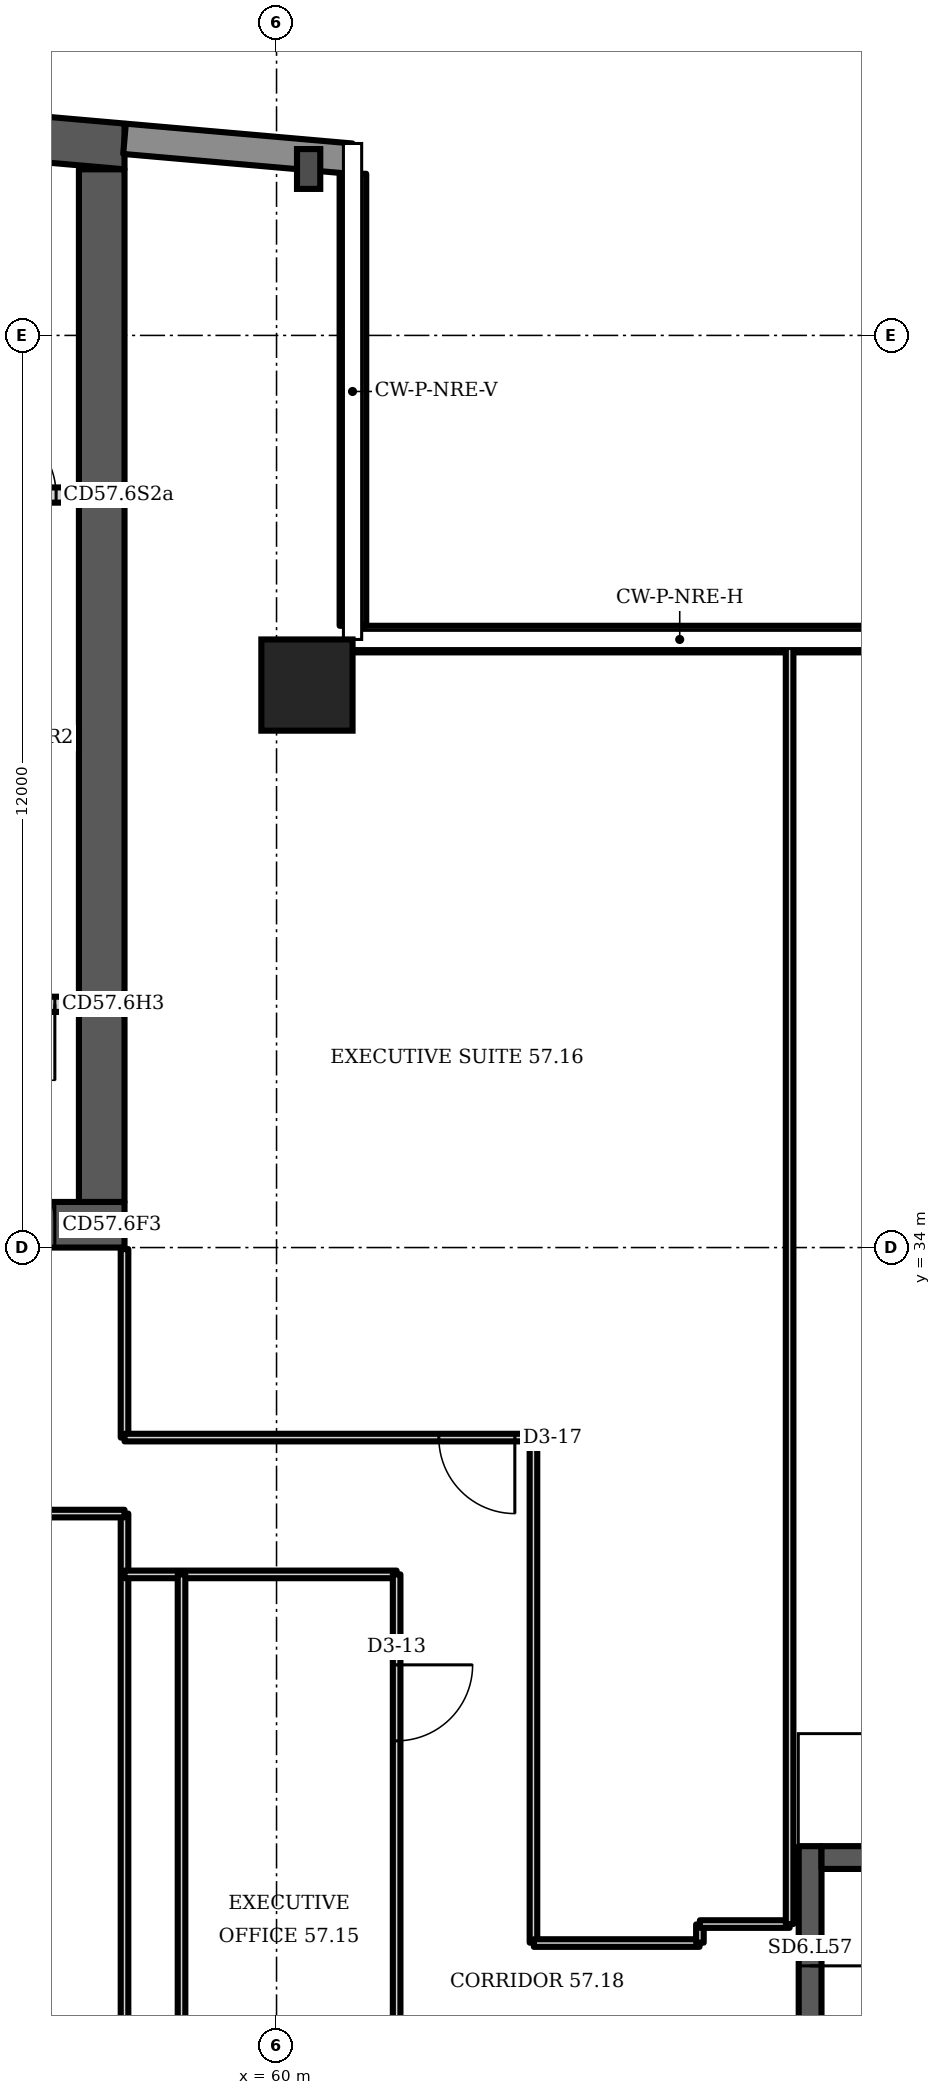
"""IFC4 building model, lengths in metres.
Left out: names, types, materials, properties, quantities, classifications, styles, units other than length and angle.
Written with IfcOpenShell. Run it as: python <this file> out.ifc"""

import sys

from ifc_helpers import new_model, si_unit, direction, frame, frame_2d, origin, origin_2d, place, context, subcontext, project, spatial, polyline, rectangle, i_section, outline, extrude, element, fill, save


model = new_model("IFC4")
c1 = context("Model", 3, precision=1e-05, world=origin(), true_north=direction((0.0, 1.0)))
c2 = subcontext(c1, "Body", "Model", "MODEL_VIEW")
j1 = project(units=[si_unit("LENGTHUNIT", "METRE"), si_unit("PLANEANGLEUNIT", "RADIAN")], contexts=[c1])
p1 = place(None, origin())
s1 = spatial("IfcSite", under=j1, at=p1, CompositionType="ELEMENT")
p2 = place(p1, origin())
s2 = spatial("IfcBuilding", under=s1, at=p2, CompositionType="ELEMENT")
p3 = place(p2, frame((0.0, 0.0, 228.7)))
s3 = spatial("IfcBuildingStorey", under=s2, at=p3, CompositionType="ELEMENT", Elevation=228.7)
p4 = place(p3, origin())
e1 = element("IfcWall", 1, at=p4, inside=s3, PredefinedType="SHEAR", context=c2, shape_type="SweptSolid", body=[
    extrude(outline(polyline([(23.0, 48.185), (40.5, 49.716), (58.0, 48.185), (58.0, 48.787), (40.5, 50.318), (23.0, 48.787), (23.0, 48.185)])), origin(), (0.0, 0.0, 1.0), 3.6),
])
p5 = place(p3, frame((23.0, 34.3, 0.0), z_axis=(0.0, 0.0, 1.0), x_axis=(1.0, 0.0, 0.0)))
e2 = element("IfcWall", 2, at=p5, inside=s3, PredefinedType="SHEAR", context=c2, shape_type="SweptSolid", body=[
    extrude(rectangle(XDim=35.0, YDim=0.6, at=frame_2d((17.5, 0.0))), origin(), (0.0, 0.0, 1.0), 3.6),
])
p6 = place(p5, frame((0.65, 0.0, 0.0)))
e3 = element("IfcOpeningElement", 3, at=p6, cuts=e2, PredefinedType="OPENING", context=c2, shape_type="SweptSolid", body=[
    extrude(rectangle(XDim=1.2, YDim=2.1, at=frame_2d((0.6, 1.05))), frame((0.0, 0.31, 0.0), z_axis=(0.0, -1.0, 0.0), x_axis=(1.0, 0.0, 0.0)), (0.0, 0.0, 1.0), 0.62),
])
p7 = place(p5, frame((7.717, 0.0, 0.0)))
e4 = element("IfcOpeningElement", 4, at=p7, cuts=e2, PredefinedType="OPENING", context=c2, shape_type="SweptSolid", body=[
    extrude(rectangle(XDim=1.1, YDim=2.1, at=frame_2d((0.55, 1.05))), frame((0.0, 0.31, 0.0), z_axis=(0.0, -1.0, 0.0), x_axis=(1.0, 0.0, 0.0)), (0.0, 0.0, 1.0), 0.62),
])
p8 = place(p5, frame((12.183, 0.0, 0.0)))
e5 = element("IfcOpeningElement", 5, at=p8, cuts=e2, PredefinedType="OPENING", context=c2, shape_type="SweptSolid", body=[
    extrude(rectangle(XDim=1.1, YDim=2.1, at=frame_2d((0.55, 1.05))), frame((0.0, 0.31, 0.0), z_axis=(0.0, -1.0, 0.0), x_axis=(1.0, 0.0, 0.0)), (0.0, 0.0, 1.0), 0.62),
])
p9 = place(p5, frame((9.8, 0.0, 0.0)))
e6 = element("IfcOpeningElement", 6, at=p9, cuts=e2, PredefinedType="OPENING", context=c2, shape_type="SweptSolid", body=[
    extrude(rectangle(XDim=1.4, YDim=2.1, at=frame_2d((0.7, 1.05))), frame((0.0, 0.31, 0.0), z_axis=(0.0, -1.0, 0.0), x_axis=(1.0, 0.0, 0.0)), (0.0, 0.0, 1.0), 0.62),
])
p10 = place(p5, frame((14.717, 0.0, 0.0)))
e7 = element("IfcOpeningElement", 7, at=p10, cuts=e2, PredefinedType="OPENING", context=c2, shape_type="SweptSolid", body=[
    extrude(rectangle(XDim=1.1, YDim=2.1, at=frame_2d((0.55, 1.05))), frame((0.0, 0.31, 0.0), z_axis=(0.0, -1.0, 0.0), x_axis=(1.0, 0.0, 0.0)), (0.0, 0.0, 1.0), 0.62),
])
p11 = place(p5, frame((16.95, 0.0, 0.0)))
e8 = element("IfcOpeningElement", 8, at=p11, cuts=e2, PredefinedType="OPENING", context=c2, shape_type="SweptSolid", body=[
    extrude(rectangle(XDim=1.1, YDim=2.1, at=frame_2d((0.55, 1.05))), frame((0.0, 0.31, 0.0), z_axis=(0.0, -1.0, 0.0), x_axis=(1.0, 0.0, 0.0)), (0.0, 0.0, 1.0), 0.62),
])
p12 = place(p5, frame((19.183, 0.0, 0.0)))
e9 = element("IfcOpeningElement", 9, at=p12, cuts=e2, PredefinedType="OPENING", context=c2, shape_type="SweptSolid", body=[
    extrude(rectangle(XDim=1.1, YDim=2.1, at=frame_2d((0.55, 1.05))), frame((0.0, 0.31, 0.0), z_axis=(0.0, -1.0, 0.0), x_axis=(1.0, 0.0, 0.0)), (0.0, 0.0, 1.0), 0.62),
])
p13 = place(p5, frame((26.15, 0.0, 0.0)))
e10 = element("IfcOpeningElement", 10, at=p13, cuts=e2, PredefinedType="OPENING", context=c2, shape_type="SweptSolid", body=[
    extrude(rectangle(XDim=1.2, YDim=2.1, at=frame_2d((0.6, 1.05))), frame((0.0, 0.31, 0.0), z_axis=(0.0, -1.0, 0.0), x_axis=(1.0, 0.0, 0.0)), (0.0, 0.0, 1.0), 0.62),
])
p14 = place(p5, frame((28.767, 0.0, 0.0)))
e11 = element("IfcOpeningElement", 11, at=p14, cuts=e2, PredefinedType="OPENING", context=c2, shape_type="SweptSolid", body=[
    extrude(rectangle(XDim=1.0, YDim=2.1, at=frame_2d((0.5, 1.05))), frame((0.0, 0.31, 0.0), z_axis=(0.0, -1.0, 0.0), x_axis=(1.0, 0.0, 0.0)), (0.0, 0.0, 1.0), 0.62),
])
p15 = place(p5, frame((33.083, 0.0, 0.0)))
e12 = element("IfcOpeningElement", 12, at=p15, cuts=e2, PredefinedType="OPENING", context=c2, shape_type="SweptSolid", body=[
    extrude(rectangle(XDim=1.0, YDim=2.1, at=frame_2d((0.5, 1.05))), frame((0.0, 0.31, 0.0), z_axis=(0.0, -1.0, 0.0), x_axis=(1.0, 0.0, 0.0)), (0.0, 0.0, 1.0), 0.62),
])
p16 = place(p5, frame((30.8, 0.0, 0.0)))
e13 = element("IfcOpeningElement", 13, at=p16, cuts=e2, PredefinedType="OPENING", context=c2, shape_type="SweptSolid", body=[
    extrude(rectangle(XDim=1.4, YDim=2.1, at=frame_2d((0.7, 1.05))), frame((0.0, 0.31, 0.0), z_axis=(0.0, -1.0, 0.0), x_axis=(1.0, 0.0, 0.0)), (0.0, 0.0, 1.0), 0.62),
])
p17 = place(p3, frame((57.7, 34.6, 0.0), z_axis=(0.0, 0.0, 1.0), x_axis=(0.0, 1.0, 0.0)))
e14 = element("IfcWall", 14, at=p17, inside=s3, PredefinedType="SHEAR", context=c2, shape_type="SweptSolid", body=[
    extrude(rectangle(XDim=13.585, YDim=0.6, at=frame_2d((6.792, 0.0))), origin(), (0.0, 0.0, 1.0), 3.6),
])
p18 = place(p3, frame((60.4, 41.4, 0.0), z_axis=(0.0, 0.0, 1.0), x_axis=(1.0, 0.0, 0.0)))
e15 = element("IfcColumn", 15, at=p18, inside=s3, PredefinedType="COLUMN", context=c2, shape_type="SweptSolid", body=[
    extrude(rectangle(XDim=1.2, YDim=1.2, at=origin_2d()), origin(), (0.0, 0.0, 1.0), 3.6),
])
p19 = place(p3, frame((60.422, 48.189, 0.0), z_axis=(0.0, 0.0, 1.0), x_axis=(1.0, 0.0, 0.0)))
e16 = element("IfcColumn", 16, at=p19, inside=s3, PredefinedType="COLUMN", context=c2, shape_type="SweptSolid", body=[
    extrude(i_section(OverallWidth=0.306, OverallDepth=0.524, WebThickness=0.021, FlangeThickness=0.04, FilletRadius=0.027, at=origin_2d()), origin(), (0.0, 0.0, 1.0), 3.6),
])
p20 = place(p3, frame((60.983, 48.326, 0.0), z_axis=(0.0, 0.0, 1.0), x_axis=(-0.996194, 0.087168, 0.0)))
e17 = element("IfcWall", 17, at=p20, inside=s3, PredefinedType="SOLIDWALL", context=c2, shape_type="SweptSolid", body=[
    extrude(rectangle(XDim=2.994, YDim=0.4, at=frame_2d((1.497, 0.0))), origin(), (0.0, 0.0, 1.0), 3.2),
])
p21 = place(p3, frame((68.803, 42.005, 0.0), z_axis=(0.0, 0.0, 1.0), x_axis=(-1.0, 0.0, 0.0)))
e18 = element("IfcWall", 18, at=p21, inside=s3, PredefinedType="SOLIDWALL", context=c2, shape_type="SweptSolid", body=[
    extrude(rectangle(XDim=7.803, YDim=0.35, at=frame_2d((3.902, 0.0))), origin(), (0.0, 0.0, 1.0), 1.0),
])
p22 = place(p3, frame((61.005, 42.18, 0.0), z_axis=(0.0, 0.0, 1.0), x_axis=(0.0, 1.0, 0.0)))
e19 = element("IfcWall", 19, at=p22, inside=s3, PredefinedType="SOLIDWALL", context=c2, shape_type="SweptSolid", body=[
    extrude(rectangle(XDim=5.947, YDim=0.35, at=frame_2d((2.973, 0.0))), origin(), (0.0, 0.0, 1.0), 1.0),
])
p23 = place(p3, frame((55.767, 37.2, 0.0), z_axis=(0.0, 0.0, 1.0), x_axis=(1.0, 0.0, 0.0)))
e20 = element("IfcWall", 20, at=p23, inside=s3, PredefinedType="PARTITIONING", context=c2, shape_type="SweptSolid", body=[
    extrude(rectangle(XDim=1.633, YDim=0.2, at=frame_2d((0.817, 0.0))), origin(), (0.0, 0.0, 1.0), 3.2),
])
p24 = place(p23, frame((0.317, 0.0, 0.0)))
e21 = element("IfcOpeningElement", 21, at=p24, cuts=e20, PredefinedType="OPENING", context=c2, shape_type="SweptSolid", body=[
    extrude(rectangle(XDim=1.0, YDim=2.1, at=frame_2d((0.5, 1.05))), frame((0.0, 0.11, 0.0), z_axis=(0.0, -1.0, 0.0), x_axis=(1.0, 0.0, 0.0)), (0.0, 0.0, 1.0), 0.22),
])
p25 = place(p3, frame((51.3, 40.7, 0.0), z_axis=(0.0, 0.0, 1.0), x_axis=(1.0, 0.0, 0.0)))
e22 = element("IfcWall", 22, at=p25, inside=s3, PredefinedType="PARTITIONING", context=c2, shape_type="SweptSolid", body=[
    extrude(rectangle(XDim=6.1, YDim=0.2, at=frame_2d((3.05, 0.0))), origin(), (0.0, 0.0, 1.0), 3.2),
])
p26 = place(p25, frame((0.417, 0.0, 0.0)))
e23 = element("IfcOpeningElement", 23, at=p26, cuts=e22, PredefinedType="OPENING", context=c2, shape_type="SweptSolid", body=[
    extrude(rectangle(XDim=1.1, YDim=2.1, at=frame_2d((0.55, 1.05))), frame((0.0, 0.11, 0.0), z_axis=(0.0, -1.0, 0.0), x_axis=(1.0, 0.0, 0.0)), (0.0, 0.0, 1.0), 0.22),
])
p27 = place(p25, frame((3.617, 0.0, 0.0)))
e24 = element("IfcOpeningElement", 24, at=p27, cuts=e22, PredefinedType="OPENING", context=c2, shape_type="SweptSolid", body=[
    extrude(rectangle(XDim=1.0, YDim=2.1, at=frame_2d((0.5, 1.05))), frame((0.0, 0.11, 0.0), z_axis=(0.0, -1.0, 0.0), x_axis=(1.0, 0.0, 0.0)), (0.0, 0.0, 1.0), 0.22),
])
p28 = place(p3, frame((51.3, 43.9, 0.0), z_axis=(0.0, 0.0, 1.0), x_axis=(1.0, 0.0, 0.0)))
e25 = element("IfcWall", 25, at=p28, inside=s3, PredefinedType="PARTITIONING", context=c2, shape_type="SweptSolid", body=[
    extrude(rectangle(XDim=6.1, YDim=0.2, at=frame_2d((3.05, 0.0))), origin(), (0.0, 0.0, 1.0), 3.2),
])
p29 = place(p28, frame((2.817, 0.0, 0.0)))
e26 = element("IfcOpeningElement", 26, at=p29, cuts=e25, PredefinedType="OPENING", context=c2, shape_type="SweptSolid", body=[
    extrude(rectangle(XDim=1.0, YDim=2.1, at=frame_2d((0.5, 1.05))), frame((0.0, 0.11, 0.0), z_axis=(0.0, -1.0, 0.0), x_axis=(1.0, 0.0, 0.0)), (0.0, 0.0, 1.0), 0.22),
])
p30 = place(p28, frame((4.8, 0.0, 0.0)))
e27 = element("IfcOpeningElement", 27, at=p30, cuts=e25, PredefinedType="OPENING", context=c2, shape_type="SweptSolid", body=[
    extrude(rectangle(XDim=1.0, YDim=2.1, at=frame_2d((0.5, 1.05))), frame((0.0, 0.11, 0.0), z_axis=(0.0, -1.0, 0.0), x_axis=(1.0, 0.0, 0.0)), (0.0, 0.0, 1.0), 0.22),
])
p31 = place(p3, frame((67.02, 21.775, 0.0), z_axis=(0.0, 0.0, 1.0), x_axis=(0.0, 1.0, 0.0)))
e28 = element("IfcWall", 28, at=p31, inside=s3, PredefinedType="SHEAR", context=c2, shape_type="SweptSolid", body=[
    extrude(rectangle(XDim=4.35, YDim=0.3, at=frame_2d((2.175, 0.0))), origin(), (0.0, 0.0, 1.0), 3.2),
])
p32 = place(p31, frame((1.575, 0.0, 0.0)))
e29 = element("IfcOpeningElement", 29, at=p32, cuts=e28, PredefinedType="OPENING", context=c2, shape_type="SweptSolid", body=[
    extrude(rectangle(XDim=1.2, YDim=2.1, at=frame_2d((0.6, 1.05))), frame((0.0, 0.16, 0.0), z_axis=(0.0, -1.0, 0.0), x_axis=(1.0, 0.0, 0.0)), (0.0, 0.0, 1.0), 0.32),
])
p33 = place(p3, frame((58.0, 17.0, 0.0), z_axis=(0.0, 0.0, 1.0), x_axis=(0.0, 1.0, 0.0)))
e30 = element("IfcWall", 30, at=p33, inside=s3, PredefinedType="PARTITIONING", context=c2, shape_type="SweptSolid", body=[
    extrude(rectangle(XDim=13.5, YDim=0.1, at=frame_2d((6.75, 0.0))), origin(), (0.0, 0.0, 1.0), 3.2),
])
p34 = place(p3, frame((58.0, 29.7, 0.0), z_axis=(0.0, 0.0, 1.0), x_axis=(1.0, 0.0, 0.0)))
e31 = element("IfcWall", 31, at=p34, inside=s3, PredefinedType="PARTITIONING", context=c2, shape_type="SweptSolid", body=[
    extrude(rectangle(XDim=3.58, YDim=0.1, at=frame_2d((1.79, 0.0))), origin(), (0.0, 0.0, 1.0), 3.2),
])
p35 = place(p3, frame((58.0, 31.5, 0.0), z_axis=(0.0, 0.0, 1.0), x_axis=(0.0, 1.0, 0.0)))
e32 = element("IfcWall", 32, at=p35, inside=s3, PredefinedType="PARTITIONING", context=c2, shape_type="SweptSolid", body=[
    extrude(rectangle(XDim=2.48, YDim=0.1, at=frame_2d((1.24, 0.0))), origin(), (0.0, 0.0, 1.0), 3.2),
])
p36 = place(p3, frame((58.0, 31.5, 0.0), z_axis=(0.0, 0.0, 1.0), x_axis=(1.0, 0.0, 0.0)))
e33 = element("IfcWall", 33, at=p36, inside=s3, PredefinedType="PARTITIONING", context=c2, shape_type="SweptSolid", body=[
    extrude(rectangle(XDim=5.38, YDim=0.1, at=frame_2d((2.69, 0.0))), origin(), (0.0, 0.0, 1.0), 3.2),
])
p37 = place(p36, frame((4.135, 0.0, 0.0)))
e34 = element("IfcOpeningElement", 34, at=p37, cuts=e33, PredefinedType="OPENING", context=c2, shape_type="SweptSolid", body=[
    extrude(rectangle(XDim=1.0, YDim=2.1, at=frame_2d((0.5, 1.05))), frame((0.0, 0.06, 0.0), z_axis=(0.0, -1.0, 0.0), x_axis=(1.0, 0.0, 0.0)), (0.0, 0.0, 1.0), 0.12),
])
p38 = place(p3, frame((58.75, 23.35, 0.0), z_axis=(0.0, 0.0, 1.0), x_axis=(0.0, 1.0, 0.0)))
e35 = element("IfcWall", 35, at=p38, inside=s3, PredefinedType="PARTITIONING", context=c2, shape_type="SweptSolid", body=[
    extrude(rectangle(XDim=6.35, YDim=0.1, at=frame_2d((3.175, 0.0))), origin(), (0.0, 0.0, 1.0), 3.2),
])
p39 = place(p3, frame((61.58, 4.88, 0.0), z_axis=(0.0, 0.0, 1.0), x_axis=(0.0, 1.0, 0.0)))
e36 = element("IfcWall", 36, at=p39, inside=s3, PredefinedType="PARTITIONING", context=c2, shape_type="SweptSolid", body=[
    extrude(rectangle(XDim=24.82, YDim=0.1, at=frame_2d((12.41, 0.0))), origin(), (0.0, 0.0, 1.0), 3.2),
])
p40 = place(p39, frame((1.24, 0.0, 0.0)))
e37 = element("IfcOpeningElement", 37, at=p40, cuts=e36, PredefinedType="OPENING", context=c2, shape_type="SweptSolid", body=[
    extrude(rectangle(XDim=1.0, YDim=2.1, at=frame_2d((0.5, 1.05))), frame((0.0, 0.06, 0.0), z_axis=(0.0, -1.0, 0.0), x_axis=(1.0, 0.0, 0.0)), (0.0, 0.0, 1.0), 0.12),
])
p41 = place(p39, frame((5.09, 0.0, 0.0)))
e38 = element("IfcOpeningElement", 38, at=p41, cuts=e36, PredefinedType="OPENING", context=c2, shape_type="SweptSolid", body=[
    extrude(rectangle(XDim=1.0, YDim=2.1, at=frame_2d((0.5, 1.05))), frame((0.0, 0.06, 0.0), z_axis=(0.0, -1.0, 0.0), x_axis=(1.0, 0.0, 0.0)), (0.0, 0.0, 1.0), 0.12),
])
p42 = place(p39, frame((9.415, 0.0, 0.0)))
e39 = element("IfcOpeningElement", 39, at=p42, cuts=e36, PredefinedType="OPENING", context=c2, shape_type="SweptSolid", body=[
    extrude(rectangle(XDim=1.0, YDim=2.1, at=frame_2d((0.5, 1.05))), frame((0.0, 0.06, 0.0), z_axis=(0.0, -1.0, 0.0), x_axis=(1.0, 0.0, 0.0)), (0.0, 0.0, 1.0), 0.12),
])
p43 = place(p39, frame((14.85, 0.0, 0.0)))
e40 = element("IfcOpeningElement", 40, at=p43, cuts=e36, PredefinedType="OPENING", context=c2, shape_type="SweptSolid", body=[
    extrude(rectangle(XDim=1.0, YDim=2.1, at=frame_2d((0.5, 1.05))), frame((0.0, 0.06, 0.0), z_axis=(0.0, -1.0, 0.0), x_axis=(1.0, 0.0, 0.0)), (0.0, 0.0, 1.0), 0.12),
])
p44 = place(p39, frame((22.63, 0.0, 0.0)))
e41 = element("IfcOpeningElement", 41, at=p44, cuts=e36, PredefinedType="OPENING", context=c2, shape_type="SweptSolid", body=[
    extrude(rectangle(XDim=1.0, YDim=2.1, at=frame_2d((0.5, 1.05))), frame((0.0, 0.06, 0.0), z_axis=(0.0, -1.0, 0.0), x_axis=(1.0, 0.0, 0.0)), (0.0, 0.0, 1.0), 0.12),
])
p45 = place(p3, frame((63.38, 24.855, 0.0), z_axis=(0.0, 0.0, 1.0), x_axis=(0.0, 1.0, 0.0)))
e42 = element("IfcWall", 42, at=p45, inside=s3, PredefinedType="PARTITIONING", context=c2, shape_type="SweptSolid", body=[
    extrude(rectangle(XDim=6.645, YDim=0.1, at=frame_2d((3.323, 0.0))), origin(), (0.0, 0.0, 1.0), 3.2),
])
p46 = place(p3, frame((63.385, 24.85, 0.0), z_axis=(0.0, 0.0, 1.0), x_axis=(1.0, 0.0, 0.0)))
e43 = element("IfcWall", 43, at=p46, inside=s3, PredefinedType="PARTITIONING", context=c2, shape_type="SweptSolid", body=[
    extrude(rectangle(XDim=2.18, YDim=0.1, at=frame_2d((1.09, 0.0))), origin(), (0.0, 0.0, 1.0), 3.2),
])
p47 = place(p3, frame((65.57, 24.855, 0.0), z_axis=(0.0, 0.0, 1.0), x_axis=(0.0, 1.0, 0.0)))
e44 = element("IfcWall", 44, at=p47, inside=s3, PredefinedType="PARTITIONING", context=c2, shape_type="SweptSolid", body=[
    extrude(rectangle(XDim=0.24, YDim=0.1, at=frame_2d((0.12, 0.0))), origin(), (0.0, 0.0, 1.0), 3.2),
])
p48 = place(p3, frame((65.57, 25.1, 0.0), z_axis=(0.0, 0.0, 1.0), x_axis=(1.0, 0.0, 0.0)))
e45 = element("IfcWall", 45, at=p48, inside=s3, PredefinedType="PARTITIONING", context=c2, shape_type="SweptSolid", body=[
    extrude(rectangle(XDim=1.18, YDim=0.1, at=frame_2d((0.59, 0.0))), origin(), (0.0, 0.0, 1.0), 3.2),
])
p49 = place(p3, frame((66.75, 25.1, 0.0), z_axis=(0.0, 0.0, 1.0), x_axis=(0.0, 1.0, 0.0)))
e46 = element("IfcWall", 46, at=p49, inside=s3, PredefinedType="PARTITIONING", context=c2, shape_type="SweptSolid", body=[
    extrude(rectangle(XDim=16.88, YDim=0.1, at=frame_2d((8.44, 0.0))), origin(), (0.0, 0.0, 1.0), 3.2),
])
p50 = place(p3, frame((44.15, 30.5, 0.0), z_axis=(0.0, 0.0, 1.0), x_axis=(1.0, 0.0, 0.0)))
e47 = element("IfcWall", 47, at=p50, inside=s3, PredefinedType="PARTITIONING", context=c2, shape_type="SweptSolid", body=[
    extrude(rectangle(XDim=13.85, YDim=0.1, at=frame_2d((6.925, 0.0))), origin(), (0.0, 0.0, 1.0), 3.2),
])
p51 = place(p50, frame((6.77, 0.0, 0.0)))
e48 = element("IfcOpeningElement", 48, at=p51, cuts=e47, PredefinedType="OPENING", context=c2, shape_type="SweptSolid", body=[
    extrude(rectangle(XDim=1.0, YDim=2.1, at=frame_2d((0.5, 1.05))), frame((0.0, 0.06, 0.0), z_axis=(0.0, -1.0, 0.0), x_axis=(1.0, 0.0, 0.0)), (0.0, 0.0, 1.0), 0.12),
])
p52 = place(p3, frame((67.17, 25.975, 0.0), z_axis=(0.0, 0.0, 1.0), x_axis=(1.0, 0.0, 0.0)))
e49 = element("IfcWall", 49, at=p52, inside=s3, PredefinedType="SHEAR", context=c2, shape_type="SweptSolid", body=[
    extrude(rectangle(XDim=7.5, YDim=0.3, at=frame_2d((3.75, 0.0))), origin(), (0.0, 0.0, 1.0), 3.2),
])
p53 = place(p15, origin())
e50 = element("IfcDoor", 50, at=p53, inside=s3, OperationType="SINGLE_SWING_LEFT", PredefinedType="DOOR", context=c2, shape_type="SweptSolid", body=[
    extrude(rectangle(XDim=1.0, YDim=2.1, at=frame_2d((0.5, 1.05))), frame((0.0, 0.025, 0.0), z_axis=(0.0, -1.0, 0.0), x_axis=(1.0, 0.0, 0.0)), (0.0, 0.0, 1.0), 0.05),
])
fill(e12, e50)
p54 = place(p24, origin())
e51 = element("IfcDoor", 51, at=p54, inside=s3, OperationType="SINGLE_SWING_RIGHT", PredefinedType="DOOR", context=c2, shape_type="SweptSolid", body=[
    extrude(rectangle(XDim=1.0, YDim=2.1, at=frame_2d((0.5, 1.05))), frame((0.0, 0.025, 0.0), z_axis=(0.0, -1.0, 0.0), x_axis=(1.0, 0.0, 0.0)), (0.0, 0.0, 1.0), 0.05),
])
fill(e21, e51)
p55 = place(p30, origin())
e52 = element("IfcDoor", 52, at=p55, inside=s3, OperationType="SINGLE_SWING_LEFT", PredefinedType="DOOR", context=c2, shape_type="SweptSolid", body=[
    extrude(rectangle(XDim=1.0, YDim=2.1, at=frame_2d((0.5, 1.05))), frame((0.0, 0.025, 0.0), z_axis=(0.0, -1.0, 0.0), x_axis=(1.0, 0.0, 0.0)), (0.0, 0.0, 1.0), 0.05),
])
fill(e27, e52)
p56 = place(p32, origin())
e53 = element("IfcDoor", 53, at=p56, inside=s3, OperationType="SINGLE_SWING_RIGHT", PredefinedType="DOOR", context=c2, shape_type="SweptSolid", body=[
    extrude(rectangle(XDim=1.2, YDim=2.1, at=frame_2d((0.6, 1.05))), frame((0.0, 0.025, 0.0), z_axis=(0.0, -1.0, 0.0), x_axis=(1.0, 0.0, 0.0)), (0.0, 0.0, 1.0), 0.05),
])
fill(e29, e53)
p57 = place(p44, origin())
e54 = element("IfcDoor", 54, at=p57, inside=s3, OperationType="SINGLE_SWING_RIGHT", PredefinedType="DOOR", context=c2, shape_type="SweptSolid", body=[
    extrude(rectangle(XDim=1.0, YDim=2.1, at=frame_2d((0.5, 1.05))), frame((0.0, 0.025, 0.0), z_axis=(0.0, -1.0, 0.0), x_axis=(1.0, 0.0, 0.0)), (0.0, 0.0, 1.0), 0.05),
])
fill(e41, e54)
p58 = place(p37, origin())
e55 = element("IfcDoor", 55, at=p58, inside=s3, OperationType="SINGLE_SWING_RIGHT", PredefinedType="DOOR", context=c2, shape_type="SweptSolid", body=[
    extrude(rectangle(XDim=1.0, YDim=2.1, at=frame_2d((0.5, 1.05))), frame((0.0, 0.025, 0.0), z_axis=(0.0, -1.0, 0.0), x_axis=(1.0, 0.0, 0.0)), (0.0, 0.0, 1.0), 0.05),
])
fill(e34, e55)
save(model, sys.argv[1])
